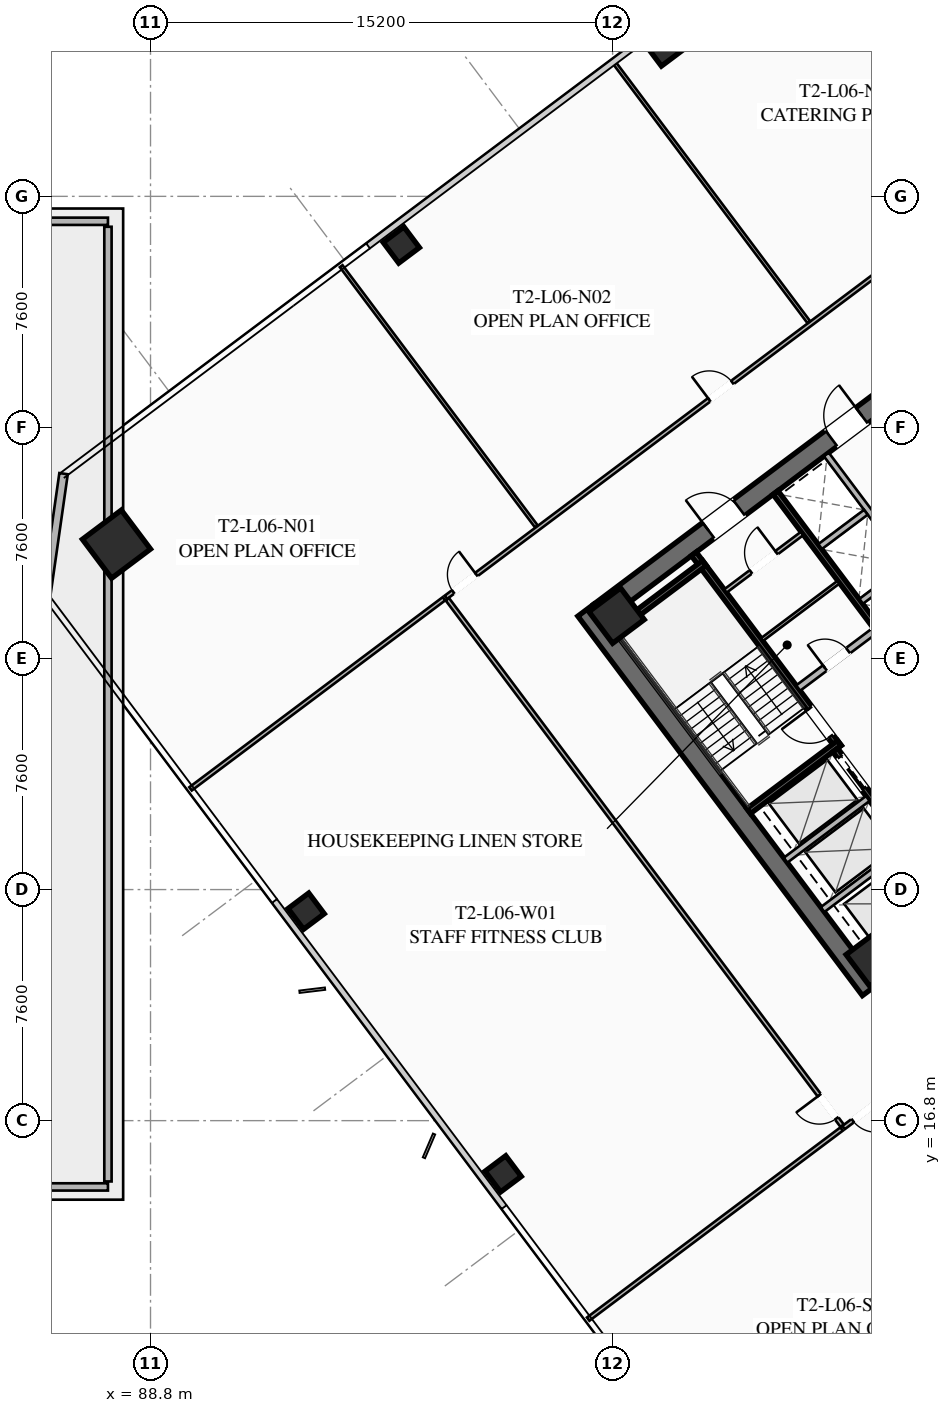
"""IFC4 building model, lengths in metres.
Left out: names, types, materials, properties, quantities, classifications, styles, units other than length and angle.
Written with IfcOpenShell. Run it as: python <this file> out.ifc"""

import sys

from ifc_helpers import new_model, si_unit, direction, frame, frame_2d, origin, origin_2d, place, context, subcontext, project, spatial, rectangle, hollow_rectangle, extrude, element, fill, save


model = new_model("IFC4")
c1 = context("Model", 3, precision=1e-05, world=origin(), true_north=direction((0.0, 1.0)))
c2 = subcontext(c1, "Body", "Model", "MODEL_VIEW")
j1 = project(units=[si_unit("LENGTHUNIT", "METRE"), si_unit("PLANEANGLEUNIT", "RADIAN")], contexts=[c1])
p1 = place(None, origin())
s1 = spatial("IfcSite", under=j1, at=p1, CompositionType="ELEMENT")
p2 = place(p1, origin())
s2 = spatial("IfcBuilding", under=s1, at=p2, CompositionType="ELEMENT")
p3 = place(p2, frame((0.0, 0.0, 24.6)))
s3 = spatial("IfcBuildingStorey", under=s2, at=p3, CompositionType="ELEMENT", Elevation=24.6)
for number, where, z_axis, x_axis in (
    (1, (87.2, 14.8, 0.0), (0.0, 0.0, 1.0), (1.0, 0.0, 0.0)),
    (2, (87.2, 46.2, 0.0), (0.0, 0.0, 1.0), (1.0, 0.0, 0.0)),
):
    element("IfcColumn", number, at=place(p3, frame(where, z_axis=z_axis, x_axis=x_axis)), inside=s3, PredefinedType="COLUMN", context=c2, shape_type="SweptSolid", body=[
        extrude(hollow_rectangle(XDim=0.5, YDim=0.5, WallThickness=0.02, at=origin_2d()), origin(), (0.0, 0.0, 1.0), 5.2),
    ])
p4 = place(p2, frame((0.0, 0.0, 28.15)))
s4 = spatial("IfcBuildingStorey", under=s2, at=p4, CompositionType="ELEMENT", Elevation=28.15)
p5 = place(p4, frame((112.476, 21.107, 0.0), z_axis=(0.0, 0.0, 1.0), x_axis=(-0.600005007985, 0.799996243986, 0.0)))
e3 = element("IfcWall", 3, at=p5, inside=s4, PredefinedType="SHEAR", context=c2, shape_type="SweptSolid", body=[
    extrude(rectangle(XDim=15.6, YDim=0.65, at=frame_2d((7.8, 0.0))), origin(), (0.0, 0.0, 1.0), 3.55),
])
p6 = place(p4, frame((124.429, 30.478, 0.0), z_axis=(0.0, 0.0, 1.0), x_axis=(-0.799998028465, -0.600002628705, 0.0)))
e4 = element("IfcWall", 4, at=p6, inside=s4, PredefinedType="SHEAR", context=c2, shape_type="SweptSolid", body=[
    extrude(rectangle(XDim=14.86, YDim=0.65, at=frame_2d((7.43, 0.0))), origin(), (0.0, 0.0, 1.0), 3.55),
])
p7 = place(p6, frame((9.13, 0.0, 0.0)))
e5 = element("IfcOpeningElement", 5, at=p7, cuts=e4, PredefinedType="OPENING", context=c2, shape_type="SweptSolid", body=[
    extrude(rectangle(XDim=1.25, YDim=2.25, at=frame_2d((0.625, 1.125))), frame((0.0, 0.335, 0.0), z_axis=(0.0, -1.0, 0.0), x_axis=(1.0, 0.0, 0.0)), (0.0, 0.0, 1.0), 0.67),
])
p8 = place(p6, frame((4.08, 0.0, 0.0)))
e6 = element("IfcOpeningElement", 6, at=p8, cuts=e4, PredefinedType="OPENING", context=c2, shape_type="SweptSolid", body=[
    extrude(rectangle(XDim=1.25, YDim=2.25, at=frame_2d((0.625, 1.125))), frame((0.0, 0.335, 0.0), z_axis=(0.0, -1.0, 0.0), x_axis=(1.0, 0.0, 0.0)), (0.0, 0.0, 1.0), 0.67),
])
p9 = place(p4, frame((103.571, 33.522, 0.0), z_axis=(0.0, 0.0, 1.0), x_axis=(0.799998028465, 0.600002628705, 0.0)))
e7 = element("IfcWall", 7, at=p9, inside=s4, PredefinedType="SHEAR", context=c2, shape_type="SweptSolid", body=[
    extrude(rectangle(XDim=14.86, YDim=0.65, at=frame_2d((7.43, 0.0))), origin(), (0.0, 0.0, 1.0), 3.55),
])
p10 = place(p9, frame((4.48, 0.0, 0.0)))
e8 = element("IfcOpeningElement", 8, at=p10, cuts=e7, PredefinedType="OPENING", context=c2, shape_type="SweptSolid", body=[
    extrude(rectangle(XDim=1.25, YDim=2.25, at=frame_2d((0.625, 1.125))), frame((0.0, 0.335, 0.0), z_axis=(0.0, -1.0, 0.0), x_axis=(1.0, 0.0, 0.0)), (0.0, 0.0, 1.0), 0.67),
])
p11 = place(p9, frame((9.53, 0.0, 0.0)))
e9 = element("IfcOpeningElement", 9, at=p11, cuts=e7, PredefinedType="OPENING", context=c2, shape_type="SweptSolid", body=[
    extrude(rectangle(XDim=1.25, YDim=2.25, at=frame_2d((0.625, 1.125))), frame((0.0, 0.335, 0.0), z_axis=(0.0, -1.0, 0.0), x_axis=(1.0, 0.0, 0.0)), (0.0, 0.0, 1.0), 0.67),
])
for number, where, z_axis, x_axis in (
    (10, (112.59, 22.13, 0.0), (0.0, 0.0, 1.0), (0.8, 0.6, 0.0)),
    (11, (104.13, 33.41, 0.0), (0.0, 0.0, 1.0), (0.8, 0.6, 0.0)),
):
    element("IfcColumn", number, at=place(p4, frame(where, z_axis=z_axis, x_axis=x_axis)), inside=s4, PredefinedType="COLUMN", context=c2, shape_type="SweptSolid", body=[
        extrude(hollow_rectangle(XDim=1.3, YDim=1.3, WallThickness=0.05, at=origin_2d()), origin(), (0.0, 0.0, 1.0), 3.35),
    ])
p12 = place(p4, frame((87.68, 35.76, 0.0), z_axis=(0.0, 0.0, 1.0), x_axis=(0.799999996291, 0.600000004945, 0.0)))
e12 = element("IfcColumn", 12, at=p12, inside=s4, PredefinedType="COLUMN", context=c2, shape_type="SweptSolid", body=[
    extrude(hollow_rectangle(XDim=1.6, YDim=1.6, WallThickness=0.06, at=origin_2d()), origin(), (0.0, 0.0, 1.0), 3.35),
])
for number, where, z_axis, x_axis in (
    (13, (105.69, 52.08, 0.0), (0.0, 0.0, 1.0), (0.8, 0.6, 0.0)),
    (14, (97.05, 45.6, 0.0), (0.0, 0.0, 1.0), (0.8, 0.6, 0.0)),
    (15, (93.92, 23.69, 0.0), (0.0, 0.0, 1.0), (0.8, 0.6, 0.0)),
    (16, (100.4, 15.05, 0.0), (0.0, 0.0, 1.0), (0.8, 0.6, 0.0)),
):
    element("IfcColumn", number, at=place(p4, frame(where, z_axis=z_axis, x_axis=x_axis)), inside=s4, PredefinedType="COLUMN", context=c2, shape_type="SweptSolid", body=[
        extrude(hollow_rectangle(XDim=0.85, YDim=0.85, WallThickness=0.035, at=origin_2d()), origin(), (0.0, 0.0, 1.0), 3.35),
    ])
for number, where, z_axis, x_axis in (
    (17, (87.4, 14.62, 1.95), (0.0, 0.0, 1.0), (-1.0, 0.0, 0.0)),
    (18, (66.2, 46.38, 1.95), (0.0, 0.0, 1.0), (1.0, 0.0, 0.0)),
):
    element("IfcWall", number, at=place(p4, frame(where, z_axis=z_axis, x_axis=x_axis)), inside=s4, PredefinedType="PARAPET", context=c2, shape_type="SweptSolid", body=[
        extrude(rectangle(XDim=21.2, YDim=0.24, at=frame_2d((10.6, 0.0))), origin(), (0.0, 0.0, 1.0), 1.15),
    ])
p13 = place(p4, frame((87.4, 46.2, 1.95), z_axis=(0.0, 0.0, 1.0), x_axis=(0.0, -1.0, 0.0)))
e19 = element("IfcWall", 19, at=p13, inside=s4, PredefinedType="PARAPET", context=c2, shape_type="SweptSolid", body=[
    extrude(rectangle(XDim=31.4, YDim=0.24, at=frame_2d((15.7, 0.0))), origin(), (0.0, 0.0, 1.0), 1.15),
])
p14 = place(p4, frame((85.36, 34.02, 0.0), z_axis=(0.0, 0.0, 1.0), x_axis=(0.14137968631, 0.989955445613, 0.0)))
e20 = element("IfcWall", 20, at=p14, inside=s4, PredefinedType="SOLIDWALL", context=c2, shape_type="SweptSolid", body=[
    extrude(rectangle(XDim=4.101, YDim=0.28, at=frame_2d((2.051, 0.0))), origin(), (0.0, 0.0, 1.0), 3.35),
])
p15 = place(p4, frame((111.44, 29.08, 0.0), z_axis=(0.0, 0.0, 1.0), x_axis=(-0.600009827119, 0.799992629566, 0.0)))
e21 = element("IfcWall", 21, at=p15, inside=s4, PredefinedType="SHEAR", context=c2, shape_type="SweptSolid", body=[
    extrude(rectangle(XDim=7.95, YDim=0.2, at=frame_2d((3.975, 0.0))), origin(), (0.0, 0.0, 1.0), 3.35),
])
p16 = place(p15, frame((0.45, 0.0, 0.0)))
e22 = element("IfcOpeningElement", 22, at=p16, cuts=e21, PredefinedType="OPENING", context=c2, shape_type="SweptSolid", body=[
    extrude(rectangle(XDim=1.15, YDim=2.2, at=frame_2d((0.575, 1.1))), frame((0.0, 0.11, 0.0), z_axis=(0.0, -1.0, 0.0), x_axis=(1.0, 0.0, 0.0)), (0.0, 0.0, 1.0), 0.22),
])
for number, where, z_axis, x_axis in (
    (23, (108.476, 26.982, 0.0), (0.0, 0.0, 1.0), (0.8, 0.6, 0.0)),
    (24, (104.036, 32.902, 0.0), (0.0, 0.0, 1.0), (0.8, 0.6, 0.0)),
):
    element("IfcWall", number, at=place(p4, frame(where, z_axis=z_axis, x_axis=x_axis)), inside=s4, PredefinedType="SHEAR", context=c2, shape_type="SweptSolid", body=[
        extrude(rectangle(XDim=3.73, YDim=0.2, at=frame_2d((1.865, 0.0))), origin(), (0.0, 0.0, 1.0), 3.35),
    ])
p17 = place(p4, frame((117.938, 26.016, 0.0), z_axis=(0.0, 0.0, 1.0), x_axis=(-0.600005463273, 0.799995902516, 0.0)))
e25 = element("IfcWall", 25, at=p17, inside=s4, PredefinedType="SHEAR", context=c2, shape_type="SweptSolid", body=[
    extrude(rectangle(XDim=14.3, YDim=0.2, at=frame_2d((7.15, 0.0))), origin(), (0.0, 0.0, 1.0), 3.35),
])
p18 = place(p4, frame((110.104, 31.028, 0.0), z_axis=(0.0, 0.0, 1.0), x_axis=(0.800018601094, 0.59997519774, 0.0)))
e26 = element("IfcWall", 26, at=p18, inside=s4, PredefinedType="SOLIDWALL", context=c2, shape_type="SweptSolid", body=[
    extrude(rectangle(XDim=3.15, YDim=0.22, at=frame_2d((1.575, 0.0))), origin(), (0.0, 0.0, 1.0), 2.703),
])
p19 = place(p18, frame((1.1, 0.0, 0.0)))
e27 = element("IfcOpeningElement", 27, at=p19, cuts=e26, PredefinedType="OPENING", context=c2, shape_type="SweptSolid", body=[
    extrude(rectangle(XDim=0.95, YDim=2.05, at=frame_2d((0.475, 1.025))), frame((0.0, 0.12, 0.0), z_axis=(0.0, -1.0, 0.0), x_axis=(1.0, 0.0, 0.0)), (0.0, 0.0, 1.0), 0.24),
])
p20 = place(p4, frame((115.13, 23.91, 0.0), z_axis=(0.0, 0.0, 1.0), x_axis=(-0.599975393228, 0.800018454488, 0.0)))
e28 = element("IfcWall", 28, at=p20, inside=s4, PredefinedType="SHEAR", context=c2, shape_type="SweptSolid", body=[
    extrude(rectangle(XDim=6.35, YDim=0.2, at=frame_2d((3.175, 0.0))), origin(), (0.0, 0.0, 1.0), 3.35),
])
p21 = place(p20, frame((4.775, 0.0, 0.0)))
e29 = element("IfcOpeningElement", 29, at=p21, cuts=e28, PredefinedType="OPENING", context=c2, shape_type="SweptSolid", body=[
    extrude(rectangle(XDim=1.3, YDim=2.25, at=frame_2d((0.65, 1.125))), frame((0.0, 0.11, 0.0), z_axis=(0.0, -1.0, 0.0), x_axis=(1.0, 0.0, 0.0)), (0.0, 0.0, 1.0), 0.22),
])
p22 = place(p20, frame((2.775, 0.0, 0.0)))
e30 = element("IfcOpeningElement", 30, at=p22, cuts=e28, PredefinedType="OPENING", context=c2, shape_type="SweptSolid", body=[
    extrude(rectangle(XDim=1.3, YDim=2.25, at=frame_2d((0.65, 1.125))), frame((0.0, 0.11, 0.0), z_axis=(0.0, -1.0, 0.0), x_axis=(1.0, 0.0, 0.0)), (0.0, 0.0, 1.0), 0.22),
])
p23 = place(p20, frame((0.575, 0.0, 0.0)))
e31 = element("IfcOpeningElement", 31, at=p23, cuts=e28, PredefinedType="OPENING", context=c2, shape_type="SweptSolid", body=[
    extrude(rectangle(XDim=1.3, YDim=2.25, at=frame_2d((0.65, 1.125))), frame((0.0, 0.11, 0.0), z_axis=(0.0, -1.0, 0.0), x_axis=(1.0, 0.0, 0.0)), (0.0, 0.0, 1.0), 0.22),
])
for number, where, z_axis, x_axis in (
    (32, (110.906, 23.742, 0.0), (0.0, 0.0, 1.0), (0.8, 0.6, 0.0)),
    (33, (109.688, 25.366, 0.0), (0.0, 0.0, 1.0), (0.8, 0.6, 0.0)),
):
    element("IfcWall", number, at=place(p4, frame(where, z_axis=z_axis, x_axis=x_axis)), inside=s4, PredefinedType="SOLIDWALL", context=c2, shape_type="SweptSolid", body=[
        extrude(rectangle(XDim=3.38, YDim=0.2, at=frame_2d((1.69, 0.0))), origin(), (0.0, 0.0, 1.0), 3.35),
    ])
p24 = place(p4, frame((107.71, 34.22, 0.0), z_axis=(0.0, 0.0, 1.0), x_axis=(0.799981399002, 0.60002480053, 0.0)))
e34 = element("IfcWall", 34, at=p24, inside=s4, PredefinedType="PARTITIONING", context=c2, shape_type="SweptSolid", body=[
    extrude(rectangle(XDim=3.15, YDim=0.135, at=frame_2d((1.575, 0.0))), origin(), (0.0, 0.0, 1.0), 2.703),
])
p25 = place(p24, frame((1.05, 0.0, 0.0)))
e35 = element("IfcOpeningElement", 35, at=p25, cuts=e34, PredefinedType="OPENING", context=c2, shape_type="SweptSolid", body=[
    extrude(rectangle(XDim=1.05, YDim=2.2, at=frame_2d((0.525, 1.1))), frame((0.0, 0.077, 0.0), z_axis=(0.0, -1.0, 0.0), x_axis=(1.0, 0.0, 0.0)), (0.0, 0.0, 1.0), 0.155),
])
p26 = place(p4, frame((108.91, 32.62, 0.0), z_axis=(0.0, 0.0, 1.0), x_axis=(0.800018601094, 0.59997519774, 0.0)))
e36 = element("IfcWall", 36, at=p26, inside=s4, PredefinedType="PARTITIONING", context=c2, shape_type="SweptSolid", body=[
    extrude(rectangle(XDim=3.15, YDim=0.11, at=frame_2d((1.575, 0.0))), origin(), (0.0, 0.0, 1.0), 2.703),
])
p27 = place(p4, frame((115.11, 33.27, 0.0), z_axis=(0.0, 0.0, 1.0), x_axis=(-0.600011488909, 0.79999138319, 0.0)))
e37 = element("IfcWall", 37, at=p27, inside=s4, PredefinedType="SOLIDWALL", context=c2, shape_type="SweptSolid", body=[
    extrude(rectangle(XDim=6.8, YDim=0.2, at=frame_2d((3.4, 0.0))), origin(), (0.0, 0.0, 1.0), 3.35),
])
p28 = place(p4, frame((112.176, 33.882, 0.0), z_axis=(0.0, 0.0, 1.0), x_axis=(0.8, 0.6, 0.0)))
e38 = element("IfcWall", 38, at=p28, inside=s4, PredefinedType="SOLIDWALL", context=c2, shape_type="SweptSolid", body=[
    extrude(rectangle(XDim=1.88, YDim=0.2, at=frame_2d((0.94, 0.0))), origin(), (0.0, 0.0, 1.0), 3.35),
])
p29 = place(p4, frame((110.826, 35.682, 0.0), z_axis=(0.0, 0.0, 1.0), x_axis=(0.799984418148, 0.600020775241, 0.0)))
e39 = element("IfcWall", 39, at=p29, inside=s4, PredefinedType="SOLIDWALL", context=c2, shape_type="SweptSolid", body=[
    extrude(rectangle(XDim=1.88, YDim=0.2, at=frame_2d((0.94, 0.0))), origin(), (0.0, 0.0, 1.0), 3.35),
])
p30 = place(p4, frame((98.516, 34.012, 0.0), z_axis=(0.0, 0.0, 1.0), x_axis=(0.799998035726, 0.600002619023, 0.0)))
e40 = element("IfcWall", 40, at=p30, inside=s4, PredefinedType="PARTITIONING", context=c2, shape_type="SweptSolid", body=[
    extrude(rectangle(XDim=29.83, YDim=0.135, at=frame_2d((14.915, 0.0))), origin(), (0.0, 0.0, 1.0), 2.703),
])
p31 = place(p30, frame((0.3, 0.0, 0.0)))
e41 = element("IfcOpeningElement", 41, at=p31, cuts=e40, PredefinedType="OPENING", context=c2, shape_type="SweptSolid", body=[
    extrude(rectangle(XDim=0.95, YDim=2.05, at=frame_2d((0.475, 1.025))), frame((0.0, 0.077, 0.0), z_axis=(0.0, -1.0, 0.0), x_axis=(1.0, 0.0, 0.0)), (0.0, 0.0, 1.0), 0.155),
])
p32 = place(p30, frame((10.829, 0.0, 0.0)))
e42 = element("IfcOpeningElement", 42, at=p32, cuts=e40, PredefinedType="OPENING", context=c2, shape_type="SweptSolid", body=[
    extrude(rectangle(XDim=0.95, YDim=2.05, at=frame_2d((0.475, 1.025))), frame((0.0, 0.077, 0.0), z_axis=(0.0, -1.0, 0.0), x_axis=(1.0, 0.0, 0.0)), (0.0, 0.0, 1.0), 0.155),
])
p33 = place(p30, frame((28.58, 0.0, 0.0)))
e43 = element("IfcOpeningElement", 43, at=p33, cuts=e40, PredefinedType="OPENING", context=c2, shape_type="SweptSolid", body=[
    extrude(rectangle(XDim=0.95, YDim=2.05, at=frame_2d((0.475, 1.025))), frame((0.0, 0.077, 0.0), z_axis=(0.0, -1.0, 0.0), x_axis=(1.0, 0.0, 0.0)), (0.0, 0.0, 1.0), 0.155),
])
for number, where, z_axis, x_axis in (
    (44, (101.492, 36.344, 0.0), (0.0, 0.0, 1.0), (-0.6, 0.8, 0.0)),
    (45, (110.452, 43.064, 0.0), (0.0, 0.0, 1.0), (-0.6, 0.8, 0.0)),
):
    element("IfcWall", number, at=place(p4, frame(where, z_axis=z_axis, x_axis=x_axis)), inside=s4, PredefinedType="PARTITIONING", context=c2, shape_type="SweptSolid", body=[
        extrude(rectangle(XDim=10.7, YDim=0.11, at=frame_2d((5.35, 0.0))), origin(), (0.0, 0.0, 1.0), 2.703),
    ])
p34 = place(p4, frame((135.46, 34.47, 0.0), z_axis=(0.0, 0.0, 1.0), x_axis=(-0.800000982127, -0.599998690494, 0.0)))
e46 = element("IfcWall", 46, at=p34, inside=s4, PredefinedType="PARTITIONING", context=c2, shape_type="SweptSolid", body=[
    extrude(rectangle(XDim=29.83, YDim=0.135, at=frame_2d((14.915, 0.0))), origin(), (0.0, 0.0, 1.0), 2.703),
])
p35 = place(p34, frame((28.5, 0.0, 0.0)))
e47 = element("IfcOpeningElement", 47, at=p35, cuts=e46, PredefinedType="OPENING", context=c2, shape_type="SweptSolid", body=[
    extrude(rectangle(XDim=0.95, YDim=2.05, at=frame_2d((0.475, 1.025))), frame((0.0, 0.077, 0.0), z_axis=(0.0, -1.0, 0.0), x_axis=(1.0, 0.0, 0.0)), (0.0, 0.0, 1.0), 0.155),
])
p36 = place(p34, frame((18.075, 0.0, 0.0)))
e48 = element("IfcOpeningElement", 48, at=p36, cuts=e46, PredefinedType="OPENING", context=c2, shape_type="SweptSolid", body=[
    extrude(rectangle(XDim=0.95, YDim=2.05, at=frame_2d((0.475, 1.025))), frame((0.0, 0.077, 0.0), z_axis=(0.0, -1.0, 0.0), x_axis=(1.0, 0.0, 0.0)), (0.0, 0.0, 1.0), 0.155),
])
p37 = place(p34, frame((0.38, 0.0, 0.0)))
e49 = element("IfcOpeningElement", 49, at=p37, cuts=e46, PredefinedType="OPENING", context=c2, shape_type="SweptSolid", body=[
    extrude(rectangle(XDim=0.95, YDim=2.05, at=frame_2d((0.475, 1.025))), frame((0.0, 0.077, 0.0), z_axis=(0.0, -1.0, 0.0), x_axis=(1.0, 0.0, 0.0)), (0.0, 0.0, 1.0), 0.155),
])
p38 = place(p4, frame((111.548, 16.636, 0.0), z_axis=(0.0, 0.0, 1.0), x_axis=(-0.600003610192, 0.799997292343, 0.0)))
e50 = element("IfcWall", 50, at=p38, inside=s4, PredefinedType="PARTITIONING", context=c2, shape_type="SweptSolid", body=[
    extrude(rectangle(XDim=21.64, YDim=0.135, at=frame_2d((10.82, 0.0))), origin(), (0.0, 0.0, 1.0), 2.703),
])
p39 = place(p38, frame((0.3, 0.0, 0.0)))
e51 = element("IfcOpeningElement", 51, at=p39, cuts=e50, PredefinedType="OPENING", context=c2, shape_type="SweptSolid", body=[
    extrude(rectangle(XDim=0.95, YDim=2.05, at=frame_2d((0.475, 1.025))), frame((0.0, 0.077, 0.0), z_axis=(0.0, -1.0, 0.0), x_axis=(1.0, 0.0, 0.0)), (0.0, 0.0, 1.0), 0.155),
])
p40 = place(p4, frame((98.452, 33.964, 0.0), z_axis=(0.0, 0.0, 1.0), x_axis=(-0.799988753532, -0.600014994998, 0.0)))
e52 = element("IfcWall", 52, at=p40, inside=s4, PredefinedType="PARTITIONING", context=c2, shape_type="SweptSolid", body=[
    extrude(rectangle(XDim=10.42, YDim=0.135, at=frame_2d((5.21, 0.0))), origin(), (0.0, 0.0, 1.0), 2.703),
])
p41 = place(p4, frame((103.196, 10.272, 0.0), z_axis=(0.0, 0.0, 1.0), x_axis=(0.8, 0.6, 0.0)))
e53 = element("IfcWall", 53, at=p41, inside=s4, PredefinedType="PARTITIONING", context=c2, shape_type="SweptSolid", body=[
    extrude(rectangle(XDim=10.42, YDim=0.135, at=frame_2d((5.21, 0.0))), origin(), (0.0, 0.0, 1.0), 2.703),
])
p42 = place(p10, origin())
e54 = element("IfcDoor", 54, at=p42, inside=s4, OperationType="SINGLE_SWING_LEFT", PredefinedType="DOOR", context=c2, shape_type="SweptSolid", body=[
    extrude(rectangle(XDim=1.25, YDim=2.25, at=frame_2d((0.625, 1.125))), frame((0.0, 0.025, 0.0), z_axis=(0.0, -1.0, 0.0), x_axis=(1.0, 0.0, 0.0)), (0.0, 0.0, 1.0), 0.05),
])
fill(e8, e54)
p43 = place(p11, origin())
e55 = element("IfcDoor", 55, at=p43, inside=s4, OperationType="SINGLE_SWING_RIGHT", PredefinedType="DOOR", context=c2, shape_type="SweptSolid", body=[
    extrude(rectangle(XDim=1.25, YDim=2.25, at=frame_2d((0.625, 1.125))), frame((0.0, 0.025, 0.0), z_axis=(0.0, -1.0, 0.0), x_axis=(1.0, 0.0, 0.0)), (0.0, 0.0, 1.0), 0.05),
])
fill(e9, e55)
p44 = place(p16, origin())
e56 = element("IfcDoor", 56, at=p44, inside=s4, OperationType="SINGLE_SWING_RIGHT", PredefinedType="DOOR", context=c2, shape_type="SweptSolid", body=[
    extrude(rectangle(XDim=1.15, YDim=2.2, at=frame_2d((0.575, 1.1))), frame((0.0, 0.025, 0.0), z_axis=(0.0, -1.0, 0.0), x_axis=(1.0, 0.0, 0.0)), (0.0, 0.0, 1.0), 0.05),
])
fill(e22, e56)
p45 = place(p25, origin())
e57 = element("IfcDoor", 57, at=p45, inside=s4, OperationType="SINGLE_SWING_RIGHT", PredefinedType="DOOR", context=c2, shape_type="SweptSolid", body=[
    extrude(rectangle(XDim=1.05, YDim=2.2, at=frame_2d((0.525, 1.1))), frame((0.0, 0.025, 0.0), z_axis=(0.0, -1.0, 0.0), x_axis=(1.0, 0.0, 0.0)), (0.0, 0.0, 1.0), 0.05),
])
fill(e35, e57)
p46 = place(p19, origin())
e58 = element("IfcDoor", 58, at=p46, inside=s4, OperationType="SINGLE_SWING_LEFT", PredefinedType="DOOR", context=c2, shape_type="SweptSolid", body=[
    extrude(rectangle(XDim=0.95, YDim=2.05, at=frame_2d((0.475, 1.025))), frame((0.0, 0.025, 0.0), z_axis=(0.0, -1.0, 0.0), x_axis=(1.0, 0.0, 0.0)), (0.0, 0.0, 1.0), 0.05),
])
fill(e27, e58)
p47 = place(p31, origin())
e59 = element("IfcDoor", 59, at=p47, inside=s4, OperationType="SINGLE_SWING_RIGHT", PredefinedType="DOOR", context=c2, shape_type="SweptSolid", body=[
    extrude(rectangle(XDim=0.95, YDim=2.05, at=frame_2d((0.475, 1.025))), frame((0.0, 0.025, 0.0), z_axis=(0.0, -1.0, 0.0), x_axis=(1.0, 0.0, 0.0)), (0.0, 0.0, 1.0), 0.05),
])
fill(e41, e59)
p48 = place(p32, origin())
e60 = element("IfcDoor", 60, at=p48, inside=s4, OperationType="SINGLE_SWING_LEFT", PredefinedType="DOOR", context=c2, shape_type="SweptSolid", body=[
    extrude(rectangle(XDim=0.95, YDim=2.05, at=frame_2d((0.475, 1.025))), frame((0.0, 0.025, 0.0), z_axis=(0.0, -1.0, 0.0), x_axis=(1.0, 0.0, 0.0)), (0.0, 0.0, 1.0), 0.05),
])
fill(e42, e60)
p49 = place(p35, origin())
e61 = element("IfcDoor", 61, at=p49, inside=s4, OperationType="SINGLE_SWING_LEFT", PredefinedType="DOOR", context=c2, shape_type="SweptSolid", body=[
    extrude(rectangle(XDim=0.95, YDim=2.05, at=frame_2d((0.475, 1.025))), frame((0.0, 0.025, 0.0), z_axis=(0.0, -1.0, 0.0), x_axis=(1.0, 0.0, 0.0)), (0.0, 0.0, 1.0), 0.05),
])
fill(e47, e61)
p50 = place(p39, origin())
e62 = element("IfcDoor", 62, at=p50, inside=s4, OperationType="SINGLE_SWING_RIGHT", PredefinedType="DOOR", context=c2, shape_type="SweptSolid", body=[
    extrude(rectangle(XDim=0.95, YDim=2.05, at=frame_2d((0.475, 1.025))), frame((0.0, 0.025, 0.0), z_axis=(0.0, -1.0, 0.0), x_axis=(1.0, 0.0, 0.0)), (0.0, 0.0, 1.0), 0.05),
])
fill(e51, e62)
p51 = place(p21, origin())
e63 = element("IfcDoor", 63, at=p51, inside=s4, OperationType="SLIDING_TO_LEFT", PredefinedType="DOOR", context=c2, shape_type="SweptSolid", body=[
    extrude(rectangle(XDim=1.3, YDim=2.25, at=frame_2d((0.65, 1.125))), frame((0.0, 0.025, 0.0), z_axis=(0.0, -1.0, 0.0), x_axis=(1.0, 0.0, 0.0)), (0.0, 0.0, 1.0), 0.05),
])
fill(e29, e63)
save(model, sys.argv[1])
